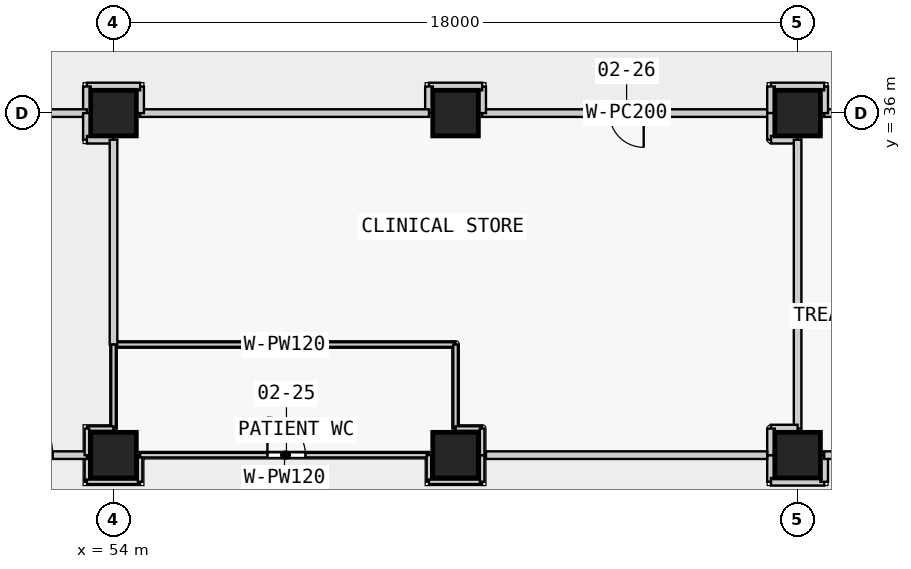
"""IFC4 building model, lengths in metres.
Left out: names, types, materials, properties, quantities, classifications, styles, units other than length and angle.
Written with IfcOpenShell. Run it as: python <this file> out.ifc"""

import sys

from ifc_helpers import new_model, si_unit, direction, frame, frame_2d, origin, origin_2d, place, context, subcontext, project, spatial, rectangle, extrude, element, fill, save


model = new_model("IFC4")
c1 = context("Model", 3, precision=1e-05, world=origin(), true_north=direction((0.0, 1.0)))
c2 = subcontext(c1, "Body", "Model", "MODEL_VIEW")
j1 = project(units=[si_unit("LENGTHUNIT", "METRE"), si_unit("PLANEANGLEUNIT", "RADIAN")], contexts=[c1])
p1 = place(None, origin())
s1 = spatial("IfcSite", under=j1, at=p1, CompositionType="ELEMENT")
p2 = place(p1, origin())
s2 = spatial("IfcBuilding", under=s1, at=p2, CompositionType="ELEMENT")
p3 = place(p2, frame((0.0, 0.0, 12.8)))
s3 = spatial("IfcBuildingStorey", under=s2, at=p3, CompositionType="ELEMENT", Elevation=12.8)
for number, where, z_axis, x_axis in (
    (1, (54.0, 27.0, 0.0), (0.0, 0.0, 1.0), (1.0, 0.0, 0.0)),
    (2, (54.0, 36.0, 0.0), (0.0, 0.0, 1.0), (1.0, 0.0, 0.0)),
    (3, (63.0, 27.0, 0.0), (0.0, 0.0, 1.0), (1.0, 0.0, 0.0)),
    (4, (63.0, 36.0, 0.0), (0.0, 0.0, 1.0), (1.0, 0.0, 0.0)),
    (5, (72.0, 27.0, 0.0), (0.0, 0.0, 1.0), (1.0, 0.0, 0.0)),
    (6, (72.0, 36.0, 0.0), (0.0, 0.0, 1.0), (1.0, 0.0, 0.0)),
):
    element("IfcColumn", number, at=place(p3, frame(where, z_axis=z_axis, x_axis=x_axis)), inside=s3, PredefinedType="COLUMN", context=c2, shape_type="SweptSolid", body=[
        extrude(rectangle(XDim=1.2, YDim=1.2, at=origin_2d()), origin(), (0.0, 0.0, 1.0), 4.5),
    ])
p4 = place(p3, frame((71.3, 36.0, 0.0), z_axis=(0.0, 0.0, 1.0), x_axis=(-1.0, 0.0, 0.0)))
e7 = element("IfcWall", 7, at=p4, inside=s3, PredefinedType="PARTITIONING", context=c2, shape_type="SweptSolid", body=[
    extrude(rectangle(XDim=7.6, YDim=0.2, at=frame_2d((3.8, 0.0))), origin(), (0.0, 0.0, 1.0), 3.45),
])
p5 = place(p4, frame((3.35, 0.0, 0.0)))
e8 = element("IfcOpeningElement", 8, at=p5, cuts=e7, PredefinedType="OPENING", context=c2, shape_type="SweptSolid", body=[
    extrude(rectangle(XDim=0.9, YDim=2.1, at=frame_2d((0.45, 1.05))), frame((0.0, 0.11, 0.0), z_axis=(0.0, -1.0, 0.0), x_axis=(1.0, 0.0, 0.0)), (0.0, 0.0, 1.0), 0.22),
])
p6 = place(p3, frame((63.7, 36.0, 0.0), z_axis=(0.0, 0.0, 1.0), x_axis=(0.0, 1.0, 0.0)))
e9 = element("IfcWall", 9, at=p6, inside=s3, PredefinedType="PARTITIONING", context=c2, shape_type="SweptSolid", body=[
    extrude(rectangle(XDim=0.7, YDim=0.2, at=frame_2d((0.35, 0.0))), origin(), (0.0, 0.0, 1.0), 3.45),
])
p7 = place(p3, frame((63.7, 36.7, 0.0), z_axis=(0.0, 0.0, 1.0), x_axis=(-1.0, 0.0, 0.0)))
e10 = element("IfcWall", 10, at=p7, inside=s3, PredefinedType="PARTITIONING", context=c2, shape_type="SweptSolid", body=[
    extrude(rectangle(XDim=1.4, YDim=0.2, at=frame_2d((0.7, 0.0))), origin(), (0.0, 0.0, 1.0), 3.45),
])
p8 = place(p3, frame((62.3, 36.7, 0.0), z_axis=(0.0, 0.0, 1.0), x_axis=(0.0, -1.0, 0.0)))
e11 = element("IfcWall", 11, at=p8, inside=s3, PredefinedType="PARTITIONING", context=c2, shape_type="SweptSolid", body=[
    extrude(rectangle(XDim=0.7, YDim=0.2, at=frame_2d((0.35, 0.0))), origin(), (0.0, 0.0, 1.0), 3.45),
])
p9 = place(p3, frame((62.3, 36.0, 0.0), z_axis=(0.0, 0.0, 1.0), x_axis=(-1.0, 0.0, 0.0)))
e12 = element("IfcWall", 12, at=p9, inside=s3, PredefinedType="PARTITIONING", context=c2, shape_type="SweptSolid", body=[
    extrude(rectangle(XDim=7.6, YDim=0.2, at=frame_2d((3.8, 0.0))), origin(), (0.0, 0.0, 1.0), 3.45),
])
p10 = place(p3, frame((54.7, 36.0, 0.0), z_axis=(0.0, 0.0, 1.0), x_axis=(0.0, 1.0, 0.0)))
e13 = element("IfcWall", 13, at=p10, inside=s3, PredefinedType="PARTITIONING", context=c2, shape_type="SweptSolid", body=[
    extrude(rectangle(XDim=0.7, YDim=0.2, at=frame_2d((0.35, 0.0))), origin(), (0.0, 0.0, 1.0), 3.45),
])
p11 = place(p3, frame((54.7, 36.7, 0.0), z_axis=(0.0, 0.0, 1.0), x_axis=(-1.0, 0.0, 0.0)))
e14 = element("IfcWall", 14, at=p11, inside=s3, PredefinedType="PARTITIONING", context=c2, shape_type="SweptSolid", body=[
    extrude(rectangle(XDim=1.4, YDim=0.2, at=frame_2d((0.7, 0.0))), origin(), (0.0, 0.0, 1.0), 3.45),
])
p12 = place(p3, frame((53.3, 36.7, 0.0), z_axis=(0.0, 0.0, 1.0), x_axis=(0.0, -1.0, 0.0)))
e15 = element("IfcWall", 15, at=p12, inside=s3, PredefinedType="PARTITIONING", context=c2, shape_type="SweptSolid", body=[
    extrude(rectangle(XDim=0.7, YDim=0.2, at=frame_2d((0.35, 0.0))), origin(), (0.0, 0.0, 1.0), 3.45),
])
p13 = place(p3, frame((53.3, 27.0, 0.0), z_axis=(0.0, 0.0, 1.0), x_axis=(0.0, -1.0, 0.0)))
e16 = element("IfcWall", 16, at=p13, inside=s3, PredefinedType="PARTITIONING", context=c2, shape_type="SweptSolid", body=[
    extrude(rectangle(XDim=0.7, YDim=0.12, at=frame_2d((0.35, 0.0))), origin(), (0.0, 0.0, 1.0), 3.45),
])
p14 = place(p3, frame((53.3, 26.3, 0.0), z_axis=(0.0, 0.0, 1.0), x_axis=(1.0, 0.0, 0.0)))
e17 = element("IfcWall", 17, at=p14, inside=s3, PredefinedType="PARTITIONING", context=c2, shape_type="SweptSolid", body=[
    extrude(rectangle(XDim=1.4, YDim=0.12, at=frame_2d((0.7, 0.0))), origin(), (0.0, 0.0, 1.0), 3.45),
])
p15 = place(p3, frame((54.7, 26.3, 0.0), z_axis=(0.0, 0.0, 1.0), x_axis=(0.0, 1.0, 0.0)))
e18 = element("IfcWall", 18, at=p15, inside=s3, PredefinedType="PARTITIONING", context=c2, shape_type="SweptSolid", body=[
    extrude(rectangle(XDim=0.7, YDim=0.12, at=frame_2d((0.35, 0.0))), origin(), (0.0, 0.0, 1.0), 3.45),
])
p16 = place(p3, frame((54.7, 27.0, 0.0), z_axis=(0.0, 0.0, 1.0), x_axis=(1.0, 0.0, 0.0)))
e19 = element("IfcWall", 19, at=p16, inside=s3, PredefinedType="PARTITIONING", context=c2, shape_type="SweptSolid", body=[
    extrude(rectangle(XDim=7.6, YDim=0.12, at=frame_2d((3.8, 0.0))), origin(), (0.0, 0.0, 1.0), 3.45),
])
p17 = place(p16, frame((3.35, 0.0, 0.0)))
e20 = element("IfcOpeningElement", 20, at=p17, cuts=e19, PredefinedType="OPENING", context=c2, shape_type="SweptSolid", body=[
    extrude(rectangle(XDim=1.0, YDim=2.1, at=frame_2d((0.5, 1.05))), frame((0.0, 0.07, 0.0), z_axis=(0.0, -1.0, 0.0), x_axis=(1.0, 0.0, 0.0)), (0.0, 0.0, 1.0), 0.14),
])
p18 = place(p3, frame((62.3, 27.0, 0.0), z_axis=(0.0, 0.0, 1.0), x_axis=(0.0, -1.0, 0.0)))
e21 = element("IfcWall", 21, at=p18, inside=s3, PredefinedType="PARTITIONING", context=c2, shape_type="SweptSolid", body=[
    extrude(rectangle(XDim=0.7, YDim=0.12, at=frame_2d((0.35, 0.0))), origin(), (0.0, 0.0, 1.0), 3.45),
])
p19 = place(p3, frame((62.3, 26.3, 0.0), z_axis=(0.0, 0.0, 1.0), x_axis=(1.0, 0.0, 0.0)))
e22 = element("IfcWall", 22, at=p19, inside=s3, PredefinedType="PARTITIONING", context=c2, shape_type="SweptSolid", body=[
    extrude(rectangle(XDim=1.4, YDim=0.12, at=frame_2d((0.7, 0.0))), origin(), (0.0, 0.0, 1.0), 3.45),
])
p20 = place(p3, frame((63.7, 26.3, 0.0), z_axis=(0.0, 0.0, 1.0), x_axis=(0.0, 1.0, 0.0)))
e23 = element("IfcWall", 23, at=p20, inside=s3, PredefinedType="PARTITIONING", context=c2, shape_type="SweptSolid", body=[
    extrude(rectangle(XDim=0.7, YDim=0.12, at=frame_2d((0.35, 0.0))), origin(), (0.0, 0.0, 1.0), 3.45),
])
p21 = place(p3, frame((54.0, 29.911, 0.0), z_axis=(0.0, 0.0, 1.0), x_axis=(1.0, 0.0, 0.0)))
e24 = element("IfcWall", 24, at=p21, inside=s3, PredefinedType="PARTITIONING", context=c2, shape_type="SweptSolid", body=[
    extrude(rectangle(XDim=9.0, YDim=0.12, at=frame_2d((4.5, 0.0))), origin(), (0.0, 0.0, 1.0), 3.45),
])
p22 = place(p3, frame((63.0, 29.911, 0.0), z_axis=(0.0, 0.0, 1.0), x_axis=(0.0, -1.0, 0.0)))
e25 = element("IfcWall", 25, at=p22, inside=s3, PredefinedType="PARTITIONING", context=c2, shape_type="SweptSolid", body=[
    extrude(rectangle(XDim=2.211, YDim=0.12, at=frame_2d((1.105, 0.0))), origin(), (0.0, 0.0, 1.0), 3.45),
])
for number, where, z_axis, x_axis in (
    (26, (63.0, 27.7, 0.0), (0.0, 0.0, 1.0), (1.0, 0.0, 0.0)),
    (27, (63.7, 27.7, 0.0), (0.0, 0.0, 1.0), (0.0, -1.0, 0.0)),
):
    element("IfcWall", number, at=place(p3, frame(where, z_axis=z_axis, x_axis=x_axis)), inside=s3, PredefinedType="PARTITIONING", context=c2, shape_type="SweptSolid", body=[
        extrude(rectangle(XDim=0.7, YDim=0.12, at=frame_2d((0.35, 0.0))), origin(), (0.0, 0.0, 1.0), 3.45),
    ])
p23 = place(p3, frame((80.3, 36.0, 0.0), z_axis=(0.0, 0.0, 1.0), x_axis=(-1.0, 0.0, 0.0)))
e28 = element("IfcWall", 28, at=p23, inside=s3, PredefinedType="PARTITIONING", context=c2, shape_type="SweptSolid", body=[
    extrude(rectangle(XDim=7.6, YDim=0.2, at=frame_2d((3.8, 0.0))), origin(), (0.0, 0.0, 1.0), 3.45),
])
p24 = place(p23, frame((3.1, 0.0, 0.0)))
e29 = element("IfcOpeningElement", 29, at=p24, cuts=e28, PredefinedType="OPENING", context=c2, shape_type="SweptSolid", body=[
    extrude(rectangle(XDim=1.4, YDim=2.1, at=frame_2d((0.7, 1.05))), frame((0.0, 0.11, 0.0), z_axis=(0.0, -1.0, 0.0), x_axis=(1.0, 0.0, 0.0)), (0.0, 0.0, 1.0), 0.22),
])
p25 = place(p3, frame((72.7, 36.0, 0.0), z_axis=(0.0, 0.0, 1.0), x_axis=(0.0, 1.0, 0.0)))
e30 = element("IfcWall", 30, at=p25, inside=s3, PredefinedType="PARTITIONING", context=c2, shape_type="SweptSolid", body=[
    extrude(rectangle(XDim=0.7, YDim=0.2, at=frame_2d((0.35, 0.0))), origin(), (0.0, 0.0, 1.0), 3.45),
])
p26 = place(p3, frame((72.7, 36.7, 0.0), z_axis=(0.0, 0.0, 1.0), x_axis=(-1.0, 0.0, 0.0)))
e31 = element("IfcWall", 31, at=p26, inside=s3, PredefinedType="PARTITIONING", context=c2, shape_type="SweptSolid", body=[
    extrude(rectangle(XDim=1.4, YDim=0.2, at=frame_2d((0.7, 0.0))), origin(), (0.0, 0.0, 1.0), 3.45),
])
for number, where, z_axis, x_axis in (
    (32, (71.3, 36.7, 0.0), (0.0, 0.0, 1.0), (0.0, -1.0, 0.0)),
    (33, (71.3, 27.0, 0.0), (0.0, 0.0, 1.0), (0.0, -1.0, 0.0)),
):
    element("IfcWall", number, at=place(p3, frame(where, z_axis=z_axis, x_axis=x_axis)), inside=s3, PredefinedType="PARTITIONING", context=c2, shape_type="SweptSolid", body=[
        extrude(rectangle(XDim=0.7, YDim=0.2, at=frame_2d((0.35, 0.0))), origin(), (0.0, 0.0, 1.0), 3.45),
    ])
p27 = place(p3, frame((71.3, 26.3, 0.0), z_axis=(0.0, 0.0, 1.0), x_axis=(1.0, 0.0, 0.0)))
e34 = element("IfcWall", 34, at=p27, inside=s3, PredefinedType="PARTITIONING", context=c2, shape_type="SweptSolid", body=[
    extrude(rectangle(XDim=1.4, YDim=0.2, at=frame_2d((0.7, 0.0))), origin(), (0.0, 0.0, 1.0), 4.15),
])
p28 = place(p3, frame((72.7, 26.3, 0.0), z_axis=(0.0, 0.0, 1.0), x_axis=(0.0, 1.0, 0.0)))
e35 = element("IfcWall", 35, at=p28, inside=s3, PredefinedType="PARTITIONING", context=c2, shape_type="SweptSolid", body=[
    extrude(rectangle(XDim=0.7, YDim=0.2, at=frame_2d((0.35, 0.0))), origin(), (0.0, 0.0, 1.0), 3.45),
])
p29 = place(p3, frame((72.7, 27.0, 0.0), z_axis=(0.0, 0.0, 1.0), x_axis=(1.0, 0.0, 0.0)))
e36 = element("IfcWall", 36, at=p29, inside=s3, PredefinedType="PARTITIONING", context=c2, shape_type="SweptSolid", body=[
    extrude(rectangle(XDim=7.6, YDim=0.2, at=frame_2d((3.8, 0.0))), origin(), (0.0, 0.0, 1.0), 3.45),
])
for number, where, z_axis, x_axis in (
    (37, (71.3, 36.0, 0.0), (0.0, 0.0, 1.0), (0.0, -1.0, 0.0)),
    (38, (71.3, 35.3, 0.0), (0.0, 0.0, 1.0), (1.0, 0.0, 0.0)),
):
    element("IfcWall", number, at=place(p3, frame(where, z_axis=z_axis, x_axis=x_axis)), inside=s3, PredefinedType="PARTITIONING", context=c2, shape_type="SweptSolid", body=[
        extrude(rectangle(XDim=0.7, YDim=0.2, at=frame_2d((0.35, 0.0))), origin(), (0.0, 0.0, 1.0), 3.45),
    ])
p30 = place(p3, frame((72.0, 35.3, 0.0), z_axis=(0.0, 0.0, 1.0), x_axis=(0.0, -1.0, 0.0)))
e39 = element("IfcWall", 39, at=p30, inside=s3, PredefinedType="PARTITIONING", context=c2, shape_type="SweptSolid", body=[
    extrude(rectangle(XDim=7.6, YDim=0.2, at=frame_2d((3.8, 0.0))), origin(), (0.0, 0.0, 1.0), 3.45),
])
for number, where, z_axis, x_axis in (
    (40, (72.0, 27.7, 0.0), (0.0, 0.0, 1.0), (-1.0, 0.0, 0.0)),
    (41, (71.3, 27.7, 0.0), (0.0, 0.0, 1.0), (0.0, -1.0, 0.0)),
):
    element("IfcWall", number, at=place(p3, frame(where, z_axis=z_axis, x_axis=x_axis)), inside=s3, PredefinedType="PARTITIONING", context=c2, shape_type="SweptSolid", body=[
        extrude(rectangle(XDim=0.7, YDim=0.2, at=frame_2d((0.35, 0.0))), origin(), (0.0, 0.0, 1.0), 3.45),
    ])
p31 = place(p3, frame((53.3, 36.0, 0.0), z_axis=(0.0, 0.0, 1.0), x_axis=(-1.0, 0.0, 0.0)))
e42 = element("IfcWall", 42, at=p31, inside=s3, PredefinedType="PARTITIONING", context=c2, shape_type="SweptSolid", body=[
    extrude(rectangle(XDim=7.6, YDim=0.2, at=frame_2d((3.8, 0.0))), origin(), (0.0, 0.0, 1.0), 3.45),
])
p32 = place(p31, frame((2.85, 0.0, 0.0)))
e43 = element("IfcOpeningElement", 43, at=p32, cuts=e42, PredefinedType="OPENING", context=c2, shape_type="SweptSolid", body=[
    extrude(rectangle(XDim=1.8, YDim=2.1, at=frame_2d((0.9, 1.05))), frame((0.0, 0.11, 0.0), z_axis=(0.0, -1.0, 0.0), x_axis=(1.0, 0.0, 0.0)), (0.0, 0.0, 1.0), 0.22),
])
p33 = place(p3, frame((63.8, 27.0, 0.0), z_axis=(0.0, 0.0, 1.0), x_axis=(1.0, 0.0, 0.0)))
e44 = element("IfcWall", 44, at=p33, inside=s3, PredefinedType="PARTITIONING", context=c2, shape_type="SweptSolid", body=[
    extrude(rectangle(XDim=7.4, YDim=0.2, at=frame_2d((3.7, 0.0))), origin(), (0.0, 0.0, 1.0), 3.45),
])
for number, where, z_axis, x_axis in (
    (45, (53.3, 36.0, 0.0), (0.0, 0.0, 1.0), (0.0, -1.0, 0.0)),
    (46, (53.3, 35.3, 0.0), (0.0, 0.0, 1.0), (1.0, 0.0, 0.0)),
):
    element("IfcWall", number, at=place(p3, frame(where, z_axis=z_axis, x_axis=x_axis)), inside=s3, PredefinedType="PARTITIONING", context=c2, shape_type="SweptSolid", body=[
        extrude(rectangle(XDim=0.7, YDim=0.2, at=frame_2d((0.35, 0.0))), origin(), (0.0, 0.0, 1.0), 3.45),
    ])
p34 = place(p3, frame((54.0, 35.3, 0.0), z_axis=(0.0, 0.0, 1.0), x_axis=(0.0, -1.0, 0.0)))
e47 = element("IfcWall", 47, at=p34, inside=s3, PredefinedType="PARTITIONING", context=c2, shape_type="SweptSolid", body=[
    extrude(rectangle(XDim=5.389, YDim=0.2, at=frame_2d((2.695, 0.0))), origin(), (0.0, 0.0, 1.0), 3.45),
])
p35 = place(p3, frame((49.5, 27.0, 0.0), z_axis=(0.0, 0.0, 1.0), x_axis=(1.0, 0.0, 0.0)))
e48 = element("IfcWall", 48, at=p35, inside=s3, PredefinedType="PARTITIONING", context=c2, shape_type="SweptSolid", body=[
    extrude(rectangle(XDim=3.8, YDim=0.2, at=frame_2d((1.9, 0.0))), origin(), (0.0, 0.0, 1.0), 3.45),
])
p36 = place(p35, frame((1.1, 0.0, 0.0)))
e49 = element("IfcOpeningElement", 49, at=p36, cuts=e48, PredefinedType="OPENING", context=c2, shape_type="SweptSolid", body=[
    extrude(rectangle(XDim=1.8, YDim=2.1, at=frame_2d((0.9, 1.05))), frame((0.0, 0.11, 0.0), z_axis=(0.0, -1.0, 0.0), x_axis=(1.0, 0.0, 0.0)), (0.0, 0.0, 1.0), 0.22),
])
p37 = place(p3, frame((54.0, 29.911, 0.0), z_axis=(0.0, 0.0, 1.0), x_axis=(0.0, -1.0, 0.0)))
e50 = element("IfcWall", 50, at=p37, inside=s3, PredefinedType="PARTITIONING", context=c2, shape_type="SweptSolid", body=[
    extrude(rectangle(XDim=2.211, YDim=0.12, at=frame_2d((1.105, 0.0))), origin(), (0.0, 0.0, 1.0), 3.45),
])
for number, where, z_axis, x_axis in (
    (51, (54.0, 27.7, 0.0), (0.0, 0.0, 1.0), (-1.0, 0.0, 0.0)),
    (52, (53.3, 27.7, 0.0), (0.0, 0.0, 1.0), (0.0, -1.0, 0.0)),
):
    element("IfcWall", number, at=place(p3, frame(where, z_axis=z_axis, x_axis=x_axis)), inside=s3, PredefinedType="PARTITIONING", context=c2, shape_type="SweptSolid", body=[
        extrude(rectangle(XDim=0.7, YDim=0.12, at=frame_2d((0.35, 0.0))), origin(), (0.0, 0.0, 1.0), 3.45),
    ])
p38 = place(p17, origin())
e53 = element("IfcDoor", 53, at=p38, inside=s3, OperationType="SINGLE_SWING_LEFT", PredefinedType="DOOR", context=c2, shape_type="SweptSolid", body=[
    extrude(rectangle(XDim=1.0, YDim=2.1, at=frame_2d((0.5, 1.05))), frame((0.0, 0.025, 0.0), z_axis=(0.0, -1.0, 0.0), x_axis=(1.0, 0.0, 0.0)), (0.0, 0.0, 1.0), 0.05),
])
fill(e20, e53)
p39 = place(p5, origin())
e54 = element("IfcDoor", 54, at=p39, inside=s3, OperationType="SINGLE_SWING_LEFT", PredefinedType="DOOR", context=c2, shape_type="SweptSolid", body=[
    extrude(rectangle(XDim=0.9, YDim=2.1, at=frame_2d((0.45, 1.05))), frame((0.0, 0.025, 0.0), z_axis=(0.0, -1.0, 0.0), x_axis=(1.0, 0.0, 0.0)), (0.0, 0.0, 1.0), 0.05),
])
fill(e8, e54)
p40 = place(p36, origin())
e55 = element("IfcDoor", 55, at=p40, inside=s3, OperationType="DOUBLE_DOOR_SINGLE_SWING", PredefinedType="DOOR", context=c2, shape_type="SweptSolid", body=[
    extrude(rectangle(XDim=1.8, YDim=2.1, at=frame_2d((0.9, 1.05))), frame((0.0, 0.025, 0.0), z_axis=(0.0, -1.0, 0.0), x_axis=(1.0, 0.0, 0.0)), (0.0, 0.0, 1.0), 0.05),
])
fill(e49, e55)
save(model, sys.argv[1])
